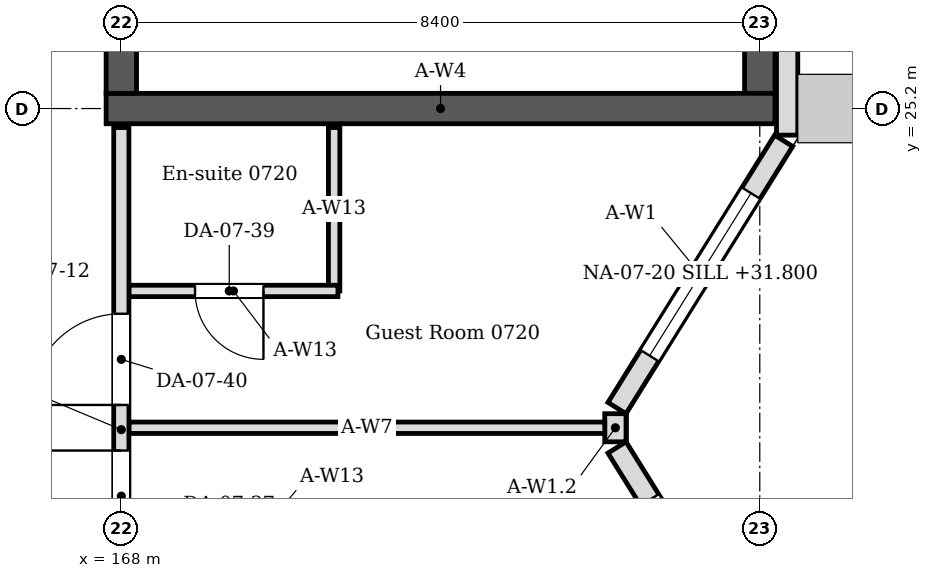
"""IFC4 building model, lengths in metres.
Left out: names, types, materials, properties, quantities, classifications, styles, units other than length and angle.
Written with IfcOpenShell. Run it as: python <this file> out.ifc"""

import sys

from ifc_helpers import new_model, si_unit, direction, frame, frame_2d, origin, place, context, subcontext, project, spatial, rectangle, extrude, element, fill, save


model = new_model("IFC4")
c1 = context("Model", 3, precision=1e-05, world=origin(), true_north=direction((0.0, 1.0)))
c2 = subcontext(c1, "Body", "Model", "MODEL_VIEW")
j1 = project(units=[si_unit("LENGTHUNIT", "METRE"), si_unit("PLANEANGLEUNIT", "RADIAN")], contexts=[c1])
p1 = place(None, origin())
s1 = spatial("IfcSite", under=j1, at=p1, CompositionType="ELEMENT")
p2 = place(p1, origin())
s2 = spatial("IfcBuilding", under=s1, at=p2, CompositionType="ELEMENT")
p3 = place(p2, frame((0.0, 0.0, 31.2)))
s3 = spatial("IfcBuildingStorey", under=s2, at=p3, CompositionType="ELEMENT", Elevation=31.2)
p4 = place(p3, frame((167.8, 25.2, 0.0), z_axis=(0.0, 0.0, 1.0), x_axis=(1.0, 0.0, 0.0)))
e1 = element("IfcWall", 1, at=p4, inside=s3, PredefinedType="SOLIDWALL", context=c2, shape_type="SweptSolid", body=[
    extrude(rectangle(XDim=8.8, YDim=0.4, at=frame_2d((4.4, 0.0))), origin(), (0.0, 0.0, 1.0), 4.05),
])
p5 = place(p3, frame((168.0, 25.4, 0.0), z_axis=(0.0, 0.0, 1.0), x_axis=(0.0, 1.0, 0.0)))
e2 = element("IfcWall", 2, at=p5, inside=s3, PredefinedType="SOLIDWALL", context=c2, shape_type="SweptSolid", body=[
    extrude(rectangle(XDim=16.4, YDim=0.4, at=frame_2d((8.2, 0.0))), origin(), (0.0, 0.0, 1.0), 4.05),
])
p6 = place(p5, frame((1.0, 0.0, 0.0)))
e3 = element("IfcOpeningElement", 3, at=p6, cuts=e2, PredefinedType="OPENING", context=c2, shape_type="SweptSolid", body=[
    extrude(rectangle(XDim=1.0, YDim=2.1, at=frame_2d((0.5, 1.05))), frame((0.0, 0.21, 0.0), z_axis=(0.0, -1.0, 0.0), x_axis=(1.0, 0.0, 0.0)), (0.0, 0.0, 1.0), 0.42),
])
p7 = place(p5, frame((14.4, 0.0, 0.0)))
e4 = element("IfcOpeningElement", 4, at=p7, cuts=e2, PredefinedType="OPENING", context=c2, shape_type="SweptSolid", body=[
    extrude(rectangle(XDim=1.4, YDim=2.1, at=frame_2d((0.7, 1.05))), frame((0.0, 0.21, 0.0), z_axis=(0.0, -1.0, 0.0), x_axis=(1.0, 0.0, 0.0)), (0.0, 0.0, 1.0), 0.42),
])
p8 = place(p3, frame((176.4, 25.4, 0.0), z_axis=(0.0, 0.0, 1.0), x_axis=(0.0, 1.0, 0.0)))
e5 = element("IfcWall", 5, at=p8, inside=s3, PredefinedType="SOLIDWALL", context=c2, shape_type="SweptSolid", body=[
    extrude(rectangle(XDim=16.4, YDim=0.4, at=frame_2d((8.2, 0.0))), origin(), (0.0, 0.0, 1.0), 4.05),
])
p9 = place(p3, frame((176.714, 17.224, 0.0), z_axis=(0.0, 0.0, 1.0), x_axis=(-0.529018946142, 0.848610013271, 0.0)))
e6 = element("IfcWall", 6, at=p9, inside=s3, PredefinedType="SOLIDWALL", context=c2, shape_type="SweptSolid", body=[
    extrude(rectangle(XDim=4.144, YDim=0.28, at=frame_2d((2.072, 0.0))), origin(), (0.0, 0.0, 1.0), 4.05),
])
p10 = place(p9, frame((0.812, 0.0, 0.6)))
e7 = element("IfcOpeningElement", 7, at=p10, cuts=e6, PredefinedType="OPENING", context=c2, shape_type="SweptSolid", body=[
    extrude(rectangle(XDim=2.52, YDim=2.4, at=frame_2d((1.26, 1.2))), frame((0.0, 0.15, 0.0), z_axis=(0.0, -1.0, 0.0), x_axis=(1.0, 0.0, 0.0)), (0.0, 0.0, 1.0), 0.3),
])
p11 = place(p3, frame((174.521, 21.259, 0.0), z_axis=(0.0, 0.0, 1.0), x_axis=(0.529018946142, 0.848610013271, 0.0)))
e8 = element("IfcWall", 8, at=p11, inside=s3, PredefinedType="SOLIDWALL", context=c2, shape_type="SweptSolid", body=[
    extrude(rectangle(XDim=4.144, YDim=0.28, at=frame_2d((2.072, 0.0))), origin(), (0.0, 0.0, 1.0), 4.05),
])
p12 = place(p11, frame((0.812, 0.0, 0.6)))
e9 = element("IfcOpeningElement", 9, at=p12, cuts=e8, PredefinedType="OPENING", context=c2, shape_type="SweptSolid", body=[
    extrude(rectangle(XDim=2.52, YDim=2.4, at=frame_2d((1.26, 1.2))), frame((0.0, 0.15, 0.0), z_axis=(0.0, -1.0, 0.0), x_axis=(1.0, 0.0, 0.0)), (0.0, 0.0, 1.0), 0.3),
])
p13 = place(p3, frame((174.5, 20.815, 0.0), z_axis=(0.0, 0.0, 1.0), x_axis=(0.0, 1.0, 0.0)))
e10 = element("IfcWall", 10, at=p13, inside=s3, PredefinedType="SOLIDWALL", context=c2, shape_type="SweptSolid", body=[
    extrude(rectangle(XDim=0.37, YDim=0.28, at=frame_2d((0.185, 0.0))), origin(), (0.0, 0.0, 1.0), 3.604),
])
p14 = place(p3, frame((176.76, 24.85, 0.0), z_axis=(0.0, 0.0, 1.0), x_axis=(0.0, 1.0, 0.0)))
e11 = element("IfcWall", 11, at=p14, inside=s3, PredefinedType="SOLIDWALL", context=c2, shape_type="SweptSolid", body=[
    extrude(rectangle(XDim=42.57, YDim=0.28, at=frame_2d((21.285, 0.0))), origin(), (0.0, 0.0, 1.0), 4.05),
])
p15 = place(p14, frame((18.41, 0.0, 0.6)))
e12 = element("IfcOpeningElement", 12, at=p15, cuts=e11, PredefinedType="OPENING", context=c2, shape_type="SweptSolid", body=[
    extrude(rectangle(XDim=2.52, YDim=2.4, at=frame_2d((1.26, 1.2))), frame((0.0, 0.15, 0.0), z_axis=(0.0, -1.0, 0.0), x_axis=(1.0, 0.0, 0.0)), (0.0, 0.0, 1.0), 0.3),
])
p16 = place(p14, frame((22.61, 0.0, 0.6)))
e13 = element("IfcOpeningElement", 13, at=p16, cuts=e11, PredefinedType="OPENING", context=c2, shape_type="SweptSolid", body=[
    extrude(rectangle(XDim=2.52, YDim=2.4, at=frame_2d((1.26, 1.2))), frame((0.0, 0.15, 0.0), z_axis=(0.0, -1.0, 0.0), x_axis=(1.0, 0.0, 0.0)), (0.0, 0.0, 1.0), 0.3),
])
p17 = place(p14, frame((26.81, 0.0, 0.6)))
e14 = element("IfcOpeningElement", 14, at=p17, cuts=e11, PredefinedType="OPENING", context=c2, shape_type="SweptSolid", body=[
    extrude(rectangle(XDim=2.52, YDim=2.4, at=frame_2d((1.26, 1.2))), frame((0.0, 0.15, 0.0), z_axis=(0.0, -1.0, 0.0), x_axis=(1.0, 0.0, 0.0)), (0.0, 0.0, 1.0), 0.3),
])
p18 = place(p14, frame((31.01, 0.0, 0.6)))
e15 = element("IfcOpeningElement", 15, at=p18, cuts=e11, PredefinedType="OPENING", context=c2, shape_type="SweptSolid", body=[
    extrude(rectangle(XDim=2.52, YDim=2.4, at=frame_2d((1.26, 1.2))), frame((0.0, 0.15, 0.0), z_axis=(0.0, -1.0, 0.0), x_axis=(1.0, 0.0, 0.0)), (0.0, 0.0, 1.0), 0.3),
])
p19 = place(p3, frame((170.8, 22.8, 0.0), z_axis=(0.0, 0.0, 1.0), x_axis=(0.0, 1.0, 0.0)))
e16 = element("IfcWall", 16, at=p19, inside=s3, PredefinedType="PARTITIONING", context=c2, shape_type="SweptSolid", body=[
    extrude(rectangle(XDim=2.15, YDim=0.15, at=frame_2d((1.075, 0.0))), origin(), (0.0, 0.0, 1.0), 4.05),
])
p20 = place(p3, frame((170.85, 22.8, 0.0), z_axis=(0.0, 0.0, 1.0), x_axis=(-1.0, 0.0, 0.0)))
e17 = element("IfcWall", 17, at=p20, inside=s3, PredefinedType="PARTITIONING", context=c2, shape_type="SweptSolid", body=[
    extrude(rectangle(XDim=2.75, YDim=0.15, at=frame_2d((1.375, 0.0))), origin(), (0.0, 0.0, 1.0), 4.05),
])
p21 = place(p20, frame((0.98, 0.0, 0.0)))
e18 = element("IfcOpeningElement", 18, at=p21, cuts=e17, PredefinedType="OPENING", context=c2, shape_type="SweptSolid", body=[
    extrude(rectangle(XDim=0.9, YDim=2.1, at=frame_2d((0.45, 1.05))), frame((0.0, 0.085, 0.0), z_axis=(0.0, -1.0, 0.0), x_axis=(1.0, 0.0, 0.0)), (0.0, 0.0, 1.0), 0.17),
])
p22 = place(p3, frame((168.1, 21.0, 0.0), z_axis=(0.0, 0.0, 1.0), x_axis=(1.0, 0.0, 0.0)))
e19 = element("IfcWall", 19, at=p22, inside=s3, PredefinedType="PARTITIONING", context=c2, shape_type="SweptSolid", body=[
    extrude(rectangle(XDim=6.26, YDim=0.15, at=frame_2d((3.13, 0.0))), origin(), (0.0, 0.0, 1.0), 3.604),
])
p23 = place(p3, frame((168.0, 17.0, 0.0), z_axis=(0.0, 0.0, 1.0), x_axis=(0.0, 1.0, 0.0)))
e20 = element("IfcWall", 20, at=p23, inside=s3, PredefinedType="PARTITIONING", context=c2, shape_type="SweptSolid", body=[
    extrude(rectangle(XDim=7.95, YDim=0.2, at=frame_2d((3.975, 0.0))), origin(), (0.0, 0.0, 1.0), 3.45),
])
p24 = place(p23, frame((2.5, 0.0, 0.0)))
e21 = element("IfcOpeningElement", 21, at=p24, cuts=e20, PredefinedType="OPENING", context=c2, shape_type="SweptSolid", body=[
    extrude(rectangle(XDim=1.2, YDim=2.1, at=frame_2d((0.6, 1.05))), frame((0.0, 0.11, 0.0), z_axis=(0.0, -1.0, 0.0), x_axis=(1.0, 0.0, 0.0)), (0.0, 0.0, 1.0), 0.22),
])
p25 = place(p23, frame((4.3, 0.0, 0.0)))
e22 = element("IfcOpeningElement", 22, at=p25, cuts=e20, PredefinedType="OPENING", context=c2, shape_type="SweptSolid", body=[
    extrude(rectangle(XDim=1.2, YDim=2.1, at=frame_2d((0.6, 1.05))), frame((0.0, 0.11, 0.0), z_axis=(0.0, -1.0, 0.0), x_axis=(1.0, 0.0, 0.0)), (0.0, 0.0, 1.0), 0.22),
])
p26 = place(p12, origin())
e23 = element("IfcWindow", 23, at=p26, inside=s3, PartitioningType="SINGLE_PANEL", PredefinedType="WINDOW", context=c2, shape_type="SweptSolid", body=[
    extrude(rectangle(XDim=2.52, YDim=2.4, at=frame_2d((1.26, 1.2))), frame((0.0, 0.03, 0.0), z_axis=(0.0, -1.0, 0.0), x_axis=(1.0, 0.0, 0.0)), (0.0, 0.0, 1.0), 0.06),
])
fill(e9, e23)
p27 = place(p24, origin())
e24 = element("IfcDoor", 24, at=p27, inside=s3, OperationType="SINGLE_SWING_RIGHT", PredefinedType="DOOR", context=c2, shape_type="SweptSolid", body=[
    extrude(rectangle(XDim=1.2, YDim=2.1, at=frame_2d((0.6, 1.05))), frame((0.0, 0.025, 0.0), z_axis=(0.0, -1.0, 0.0), x_axis=(1.0, 0.0, 0.0)), (0.0, 0.0, 1.0), 0.05),
])
fill(e21, e24)
p28 = place(p21, origin())
e25 = element("IfcDoor", 25, at=p28, inside=s3, OperationType="SINGLE_SWING_LEFT", PredefinedType="DOOR", context=c2, shape_type="SweptSolid", body=[
    extrude(rectangle(XDim=0.9, YDim=2.1, at=frame_2d((0.45, 1.05))), frame((0.0, 0.025, 0.0), z_axis=(0.0, -1.0, 0.0), x_axis=(1.0, 0.0, 0.0)), (0.0, 0.0, 1.0), 0.05),
])
fill(e18, e25)
p29 = place(p25, origin())
e26 = element("IfcDoor", 26, at=p29, inside=s3, OperationType="SINGLE_SWING_LEFT", PredefinedType="DOOR", context=c2, shape_type="SweptSolid", body=[
    extrude(rectangle(XDim=1.2, YDim=2.1, at=frame_2d((0.6, 1.05))), frame((0.0, 0.025, 0.0), z_axis=(0.0, -1.0, 0.0), x_axis=(1.0, 0.0, 0.0)), (0.0, 0.0, 1.0), 0.05),
])
fill(e22, e26)
save(model, sys.argv[1])
